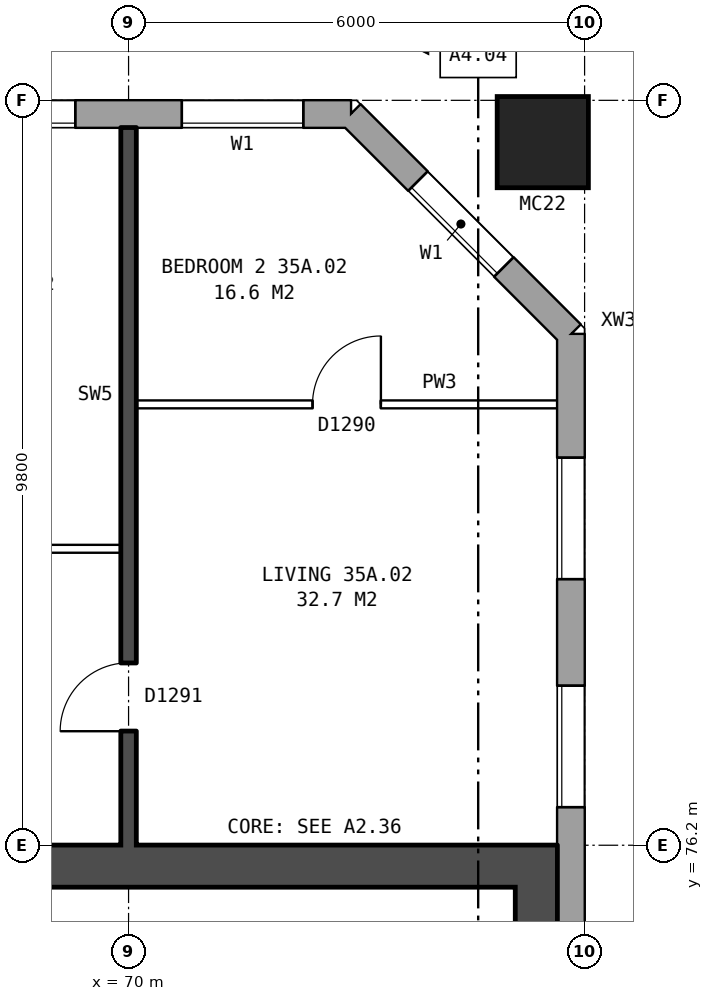
"""IFC4 building model, lengths in metres.
Left out: names, types, materials, properties, quantities, classifications, styles, units other than length and angle.
Written with IfcOpenShell. Run it as: python <this file> out.ifc"""

import sys

from ifc_helpers import new_model, si_unit, direction, frame, frame_2d, origin, origin_2d, place, context, subcontext, project, spatial, rectangle, hollow_rectangle, extrude, element, fill, save


model = new_model("IFC4")
c1 = context("Model", 3, precision=1e-05, world=origin(), true_north=direction((0.0, 1.0)))
c2 = subcontext(c1, "Body", "Model", "MODEL_VIEW")
j1 = project(units=[si_unit("LENGTHUNIT", "METRE"), si_unit("PLANEANGLEUNIT", "RADIAN")], contexts=[c1])
p1 = place(None, origin())
s1 = spatial("IfcSite", under=j1, at=p1, CompositionType="ELEMENT")
p2 = place(p1, origin())
s2 = spatial("IfcBuilding", under=s1, at=p2, CompositionType="ELEMENT")
p3 = place(p2, frame((0.0, 0.0, 126.8)))
s3 = spatial("IfcBuildingStorey", under=s2, at=p3, CompositionType="ELEMENT", Elevation=126.8)
p4 = place(p3, frame((75.45, 85.45, 0.0), z_axis=(0.0, 0.0, 1.0), x_axis=(1.0, 0.0, 0.0)))
e1 = element("IfcColumn", 1, at=p4, inside=s3, PredefinedType="COLUMN", context=c2, shape_type="SweptSolid", body=[
    extrude(hollow_rectangle(XDim=1.2, YDim=1.2, WallThickness=0.065, at=origin_2d()), origin(), (0.0, 0.0, 1.0), 3.1),
])
p5 = place(p3, frame((75.82, 57.075, 0.0), z_axis=(0.0, 0.0, 1.0), x_axis=(0.0, 1.0, 0.0)))
e2 = element("IfcWall", 2, at=p5, inside=s3, PredefinedType="STANDARD", context=c2, shape_type="SweptSolid", body=[
    extrude(rectangle(XDim=25.851, YDim=0.36, at=frame_2d((12.925, 0.0))), origin(), (0.0, 0.0, 1.0), 2.85),
])
p6 = place(p5, frame((1.625, 0.0, 0.8)))
e3 = element("IfcOpeningElement", 3, at=p6, cuts=e2, PredefinedType="OPENING", context=c2, shape_type="SweptSolid", body=[
    extrude(rectangle(XDim=1.6, YDim=1.8, at=frame_2d((0.8, 0.9))), frame((0.0, 0.19, 0.0), z_axis=(0.0, -1.0, 0.0), x_axis=(1.0, 0.0, 0.0)), (0.0, 0.0, 1.0), 0.38),
])
p7 = place(p5, frame((4.625, 0.0, 0.8)))
e4 = element("IfcOpeningElement", 4, at=p7, cuts=e2, PredefinedType="OPENING", context=c2, shape_type="SweptSolid", body=[
    extrude(rectangle(XDim=1.6, YDim=1.8, at=frame_2d((0.8, 0.9))), frame((0.0, 0.19, 0.0), z_axis=(0.0, -1.0, 0.0), x_axis=(1.0, 0.0, 0.0)), (0.0, 0.0, 1.0), 0.38),
])
p8 = place(p5, frame((19.625, 0.0, 0.8)))
e5 = element("IfcOpeningElement", 5, at=p8, cuts=e2, PredefinedType="OPENING", context=c2, shape_type="SweptSolid", body=[
    extrude(rectangle(XDim=1.6, YDim=1.8, at=frame_2d((0.8, 0.9))), frame((0.0, 0.19, 0.0), z_axis=(0.0, -1.0, 0.0), x_axis=(1.0, 0.0, 0.0)), (0.0, 0.0, 1.0), 0.38),
])
p9 = place(p5, frame((22.625, 0.0, 0.8)))
e6 = element("IfcOpeningElement", 6, at=p9, cuts=e2, PredefinedType="OPENING", context=c2, shape_type="SweptSolid", body=[
    extrude(rectangle(XDim=1.6, YDim=1.8, at=frame_2d((0.8, 0.9))), frame((0.0, 0.19, 0.0), z_axis=(0.0, -1.0, 0.0), x_axis=(1.0, 0.0, 0.0)), (0.0, 0.0, 1.0), 0.38),
])
p10 = place(p3, frame((75.82, 82.925, 0.0), z_axis=(0.0, 0.0, 1.0), x_axis=(-0.707106781187, 0.707106781187, 0.0)))
e7 = element("IfcWall", 7, at=p10, inside=s3, PredefinedType="STANDARD", context=c2, shape_type="SweptSolid", body=[
    extrude(rectangle(XDim=4.094, YDim=0.36, at=frame_2d((2.047, 0.0))), origin(), (0.0, 0.0, 1.0), 2.85),
])
p11 = place(p10, frame((1.247, 0.0, 0.8)))
e8 = element("IfcOpeningElement", 8, at=p11, cuts=e7, PredefinedType="OPENING", context=c2, shape_type="SweptSolid", body=[
    extrude(rectangle(XDim=1.6, YDim=1.8, at=frame_2d((0.8, 0.9))), frame((0.0, 0.19, 0.0), z_axis=(0.0, -1.0, 0.0), x_axis=(1.0, 0.0, 0.0)), (0.0, 0.0, 1.0), 0.38),
])
p12 = place(p3, frame((72.925, 85.82, 0.0), z_axis=(0.0, 0.0, 1.0), x_axis=(-1.0, 0.0, 0.0)))
e9 = element("IfcWall", 9, at=p12, inside=s3, PredefinedType="STANDARD", context=c2, shape_type="SweptSolid", body=[
    extrude(rectangle(XDim=43.101, YDim=0.36, at=frame_2d((21.55, 0.0))), origin(), (0.0, 0.0, 1.0), 2.85),
])
p13 = place(p12, frame((0.625, 0.0, 0.8)))
e10 = element("IfcOpeningElement", 10, at=p13, cuts=e9, PredefinedType="OPENING", context=c2, shape_type="SweptSolid", body=[
    extrude(rectangle(XDim=1.6, YDim=1.8, at=frame_2d((0.8, 0.9))), frame((0.0, 0.19, 0.0), z_axis=(0.0, -1.0, 0.0), x_axis=(1.0, 0.0, 0.0)), (0.0, 0.0, 1.0), 0.38),
])
p14 = place(p12, frame((3.625, 0.0, 0.8)))
e11 = element("IfcOpeningElement", 11, at=p14, cuts=e9, PredefinedType="OPENING", context=c2, shape_type="SweptSolid", body=[
    extrude(rectangle(XDim=1.6, YDim=1.8, at=frame_2d((0.8, 0.9))), frame((0.0, 0.19, 0.0), z_axis=(0.0, -1.0, 0.0), x_axis=(1.0, 0.0, 0.0)), (0.0, 0.0, 1.0), 0.38),
])
p15 = place(p12, frame((5.525, 0.0, 1.7)))
e12 = element("IfcOpeningElement", 12, at=p15, cuts=e9, PredefinedType="OPENING", context=c2, shape_type="SweptSolid", body=[
    extrude(rectangle(XDim=0.8, YDim=0.9, at=frame_2d((0.4, 0.45))), frame((0.0, 0.19, 0.0), z_axis=(0.0, -1.0, 0.0), x_axis=(1.0, 0.0, 0.0)), (0.0, 0.0, 1.0), 0.38),
])
p16 = place(p12, frame((9.625, 0.0, 0.8)))
e13 = element("IfcOpeningElement", 13, at=p16, cuts=e9, PredefinedType="OPENING", context=c2, shape_type="SweptSolid", body=[
    extrude(rectangle(XDim=1.6, YDim=1.8, at=frame_2d((0.8, 0.9))), frame((0.0, 0.19, 0.0), z_axis=(0.0, -1.0, 0.0), x_axis=(1.0, 0.0, 0.0)), (0.0, 0.0, 1.0), 0.38),
])
p17 = place(p12, frame((12.625, 0.0, 0.8)))
e14 = element("IfcOpeningElement", 14, at=p17, cuts=e9, PredefinedType="OPENING", context=c2, shape_type="SweptSolid", body=[
    extrude(rectangle(XDim=1.6, YDim=1.8, at=frame_2d((0.8, 0.9))), frame((0.0, 0.19, 0.0), z_axis=(0.0, -1.0, 0.0), x_axis=(1.0, 0.0, 0.0)), (0.0, 0.0, 1.0), 0.38),
])
p18 = place(p12, frame((15.625, 0.0, 0.8)))
e15 = element("IfcOpeningElement", 15, at=p18, cuts=e9, PredefinedType="OPENING", context=c2, shape_type="SweptSolid", body=[
    extrude(rectangle(XDim=1.6, YDim=1.8, at=frame_2d((0.8, 0.9))), frame((0.0, 0.19, 0.0), z_axis=(0.0, -1.0, 0.0), x_axis=(1.0, 0.0, 0.0)), (0.0, 0.0, 1.0), 0.38),
])
p19 = place(p12, frame((18.625, 0.0, 0.8)))
e16 = element("IfcOpeningElement", 16, at=p19, cuts=e9, PredefinedType="OPENING", context=c2, shape_type="SweptSolid", body=[
    extrude(rectangle(XDim=1.6, YDim=1.8, at=frame_2d((0.8, 0.9))), frame((0.0, 0.19, 0.0), z_axis=(0.0, -1.0, 0.0), x_axis=(1.0, 0.0, 0.0)), (0.0, 0.0, 1.0), 0.38),
])
p20 = place(p12, frame((21.625, 0.0, 0.8)))
e17 = element("IfcOpeningElement", 17, at=p20, cuts=e9, PredefinedType="OPENING", context=c2, shape_type="SweptSolid", body=[
    extrude(rectangle(XDim=1.6, YDim=1.8, at=frame_2d((0.8, 0.9))), frame((0.0, 0.19, 0.0), z_axis=(0.0, -1.0, 0.0), x_axis=(1.0, 0.0, 0.0)), (0.0, 0.0, 1.0), 0.38),
])
p21 = place(p12, frame((24.625, 0.0, 0.8)))
e18 = element("IfcOpeningElement", 18, at=p21, cuts=e9, PredefinedType="OPENING", context=c2, shape_type="SweptSolid", body=[
    extrude(rectangle(XDim=1.6, YDim=1.8, at=frame_2d((0.8, 0.9))), frame((0.0, 0.19, 0.0), z_axis=(0.0, -1.0, 0.0), x_axis=(1.0, 0.0, 0.0)), (0.0, 0.0, 1.0), 0.38),
])
p22 = place(p12, frame((27.625, 0.0, 0.8)))
e19 = element("IfcOpeningElement", 19, at=p22, cuts=e9, PredefinedType="OPENING", context=c2, shape_type="SweptSolid", body=[
    extrude(rectangle(XDim=1.6, YDim=1.8, at=frame_2d((0.8, 0.9))), frame((0.0, 0.19, 0.0), z_axis=(0.0, -1.0, 0.0), x_axis=(1.0, 0.0, 0.0)), (0.0, 0.0, 1.0), 0.38),
])
p23 = place(p12, frame((30.625, 0.0, 0.8)))
e20 = element("IfcOpeningElement", 20, at=p23, cuts=e9, PredefinedType="OPENING", context=c2, shape_type="SweptSolid", body=[
    extrude(rectangle(XDim=1.6, YDim=1.8, at=frame_2d((0.8, 0.9))), frame((0.0, 0.19, 0.0), z_axis=(0.0, -1.0, 0.0), x_axis=(1.0, 0.0, 0.0)), (0.0, 0.0, 1.0), 0.38),
])
p24 = place(p12, frame((33.125, 0.0, 0.8)))
e21 = element("IfcOpeningElement", 21, at=p24, cuts=e9, PredefinedType="OPENING", context=c2, shape_type="SweptSolid", body=[
    extrude(rectangle(XDim=1.4, YDim=1.8, at=frame_2d((0.7, 0.9))), frame((0.0, 0.19, 0.0), z_axis=(0.0, -1.0, 0.0), x_axis=(1.0, 0.0, 0.0)), (0.0, 0.0, 1.0), 0.38),
])
p25 = place(p12, frame((34.825, 0.0, 0.8)))
e22 = element("IfcOpeningElement", 22, at=p25, cuts=e9, PredefinedType="OPENING", context=c2, shape_type="SweptSolid", body=[
    extrude(rectangle(XDim=0.6, YDim=0.9, at=frame_2d((0.3, 0.45))), frame((0.0, 0.19, 0.0), z_axis=(0.0, -1.0, 0.0), x_axis=(1.0, 0.0, 0.0)), (0.0, 0.0, 1.0), 0.38),
])
p26 = place(p12, frame((39.625, 0.0, 0.8)))
e23 = element("IfcOpeningElement", 23, at=p26, cuts=e9, PredefinedType="OPENING", context=c2, shape_type="SweptSolid", body=[
    extrude(rectangle(XDim=1.6, YDim=1.8, at=frame_2d((0.8, 0.9))), frame((0.0, 0.19, 0.0), z_axis=(0.0, -1.0, 0.0), x_axis=(1.0, 0.0, 0.0)), (0.0, 0.0, 1.0), 0.38),
])
p27 = place(p12, frame((7.525, 0.0, 0.8)))
e24 = element("IfcOpeningElement", 24, at=p27, cuts=e9, PredefinedType="OPENING", context=c2, shape_type="SweptSolid", body=[
    extrude(rectangle(XDim=1.2, YDim=0.9, at=frame_2d((0.6, 0.45))), frame((0.0, 0.19, 0.0), z_axis=(0.0, -1.0, 0.0), x_axis=(1.0, 0.0, 0.0)), (0.0, 0.0, 1.0), 0.38),
])
p28 = place(p12, frame((36.725, 0.0, 1.7)))
e25 = element("IfcOpeningElement", 25, at=p28, cuts=e9, PredefinedType="OPENING", context=c2, shape_type="SweptSolid", body=[
    extrude(rectangle(XDim=0.6, YDim=0.9, at=frame_2d((0.3, 0.45))), frame((0.0, 0.19, 0.0), z_axis=(0.0, -1.0, 0.0), x_axis=(1.0, 0.0, 0.0)), (0.0, 0.0, 1.0), 0.38),
])
p29 = place(p12, frame((37.725, 0.0, 0.8)))
e26 = element("IfcOpeningElement", 26, at=p29, cuts=e9, PredefinedType="OPENING", context=c2, shape_type="SweptSolid", body=[
    extrude(rectangle(XDim=1.0, YDim=1.8, at=frame_2d((0.5, 0.9))), frame((0.0, 0.19, 0.0), z_axis=(0.0, -1.0, 0.0), x_axis=(1.0, 0.0, 0.0)), (0.0, 0.0, 1.0), 0.38),
])
p30 = place(p3, frame((75.365, 63.8, 0.0), z_axis=(0.0, 0.0, 1.0), x_axis=(0.0, 1.0, 0.0)))
e27 = element("IfcWall", 27, at=p30, inside=s3, PredefinedType="SHEAR", context=c2, shape_type="SweptSolid", body=[
    extrude(rectangle(XDim=12.4, YDim=0.55, at=frame_2d((6.2, 0.0))), origin(), (0.0, 0.0, 1.0), 2.85),
])
p31 = place(p3, frame((67.19, 75.925, 0.0), z_axis=(0.0, 0.0, 1.0), x_axis=(1.0, 0.0, 0.0)))
e28 = element("IfcWall", 28, at=p31, inside=s3, PredefinedType="SHEAR", context=c2, shape_type="SweptSolid", body=[
    extrude(rectangle(XDim=7.9, YDim=0.55, at=frame_2d((3.95, 0.0))), origin(), (0.0, 0.0, 1.0), 2.85),
])
p32 = place(p3, frame((64.1, 80.1, 0.0), z_axis=(0.0, 0.0, 1.0), x_axis=(1.0, 0.0, 0.0)))
e29 = element("IfcWall", 29, at=p32, inside=s3, PredefinedType="PARTITIONING", context=c2, shape_type="SweptSolid", body=[
    extrude(rectangle(XDim=5.8, YDim=0.1, at=frame_2d((2.9, 0.0))), origin(), (0.0, 0.0, 1.0), 2.85),
])
p33 = place(p32, frame((3.6, 0.0, 0.0)))
e30 = element("IfcOpeningElement", 30, at=p33, cuts=e29, PredefinedType="OPENING", context=c2, shape_type="SweptSolid", body=[
    extrude(rectangle(XDim=0.9, YDim=2.1, at=frame_2d((0.45, 1.05))), frame((0.0, 0.06, 0.0), z_axis=(0.0, -1.0, 0.0), x_axis=(1.0, 0.0, 0.0)), (0.0, 0.0, 1.0), 0.12),
])
p34 = place(p32, frame((0.7, 0.0, 0.0)))
e31 = element("IfcOpeningElement", 31, at=p34, cuts=e29, PredefinedType="OPENING", context=c2, shape_type="SweptSolid", body=[
    extrude(rectangle(XDim=0.9, YDim=2.1, at=frame_2d((0.45, 1.05))), frame((0.0, 0.06, 0.0), z_axis=(0.0, -1.0, 0.0), x_axis=(1.0, 0.0, 0.0)), (0.0, 0.0, 1.0), 0.12),
])
p35 = place(p3, frame((70.1, 82.0, 0.0), z_axis=(0.0, 0.0, 1.0), x_axis=(1.0, 0.0, 0.0)))
e32 = element("IfcWall", 32, at=p35, inside=s3, PredefinedType="PARTITIONING", context=c2, shape_type="SweptSolid", body=[
    extrude(rectangle(XDim=5.54, YDim=0.1, at=frame_2d((2.77, 0.0))), origin(), (0.0, 0.0, 1.0), 2.85),
])
p36 = place(p35, frame((2.32, 0.0, 0.0)))
e33 = element("IfcOpeningElement", 33, at=p36, cuts=e32, PredefinedType="OPENING", context=c2, shape_type="SweptSolid", body=[
    extrude(rectangle(XDim=0.9, YDim=2.1, at=frame_2d((0.45, 1.05))), frame((0.0, 0.06, 0.0), z_axis=(0.0, -1.0, 0.0), x_axis=(1.0, 0.0, 0.0)), (0.0, 0.0, 1.0), 0.12),
])
p37 = place(p3, frame((70.0, 76.2, 0.0), z_axis=(0.0, 0.0, 1.0), x_axis=(0.0, 1.0, 0.0)))
e34 = element("IfcWall", 34, at=p37, inside=s3, PredefinedType="SOLIDWALL", context=c2, shape_type="SweptSolid", body=[
    extrude(rectangle(XDim=9.44, YDim=0.2, at=frame_2d((4.72, 0.0))), origin(), (0.0, 0.0, 1.0), 2.85),
])
p38 = place(p37, frame((1.5, 0.0, 0.0)))
e35 = element("IfcOpeningElement", 35, at=p38, cuts=e34, PredefinedType="OPENING", context=c2, shape_type="SweptSolid", body=[
    extrude(rectangle(XDim=0.9, YDim=2.1, at=frame_2d((0.45, 1.05))), frame((0.0, 0.11, 0.0), z_axis=(0.0, -1.0, 0.0), x_axis=(1.0, 0.0, 0.0)), (0.0, 0.0, 1.0), 0.22),
])
p39 = place(p8, origin())
e36 = element("IfcWindow", 36, at=p39, inside=s3, PartitioningType="SINGLE_PANEL", PredefinedType="WINDOW", context=c2, shape_type="SweptSolid", body=[
    extrude(rectangle(XDim=1.6, YDim=1.8, at=frame_2d((0.8, 0.9))), frame((0.0, 0.15, 0.0), z_axis=(0.0, -1.0, 0.0), x_axis=(1.0, 0.0, 0.0)), (0.0, 0.0, 1.0), 0.06),
])
fill(e5, e36)
p40 = place(p9, origin())
e37 = element("IfcWindow", 37, at=p40, inside=s3, PartitioningType="SINGLE_PANEL", PredefinedType="WINDOW", context=c2, shape_type="SweptSolid", body=[
    extrude(rectangle(XDim=1.6, YDim=1.8, at=frame_2d((0.8, 0.9))), frame((0.0, 0.15, 0.0), z_axis=(0.0, -1.0, 0.0), x_axis=(1.0, 0.0, 0.0)), (0.0, 0.0, 1.0), 0.06),
])
fill(e6, e37)
p41 = place(p11, origin())
e38 = element("IfcWindow", 38, at=p41, inside=s3, PartitioningType="SINGLE_PANEL", PredefinedType="WINDOW", context=c2, shape_type="SweptSolid", body=[
    extrude(rectangle(XDim=1.6, YDim=1.8, at=frame_2d((0.8, 0.9))), frame((0.0, 0.15, 0.0), z_axis=(0.0, -1.0, 0.0), x_axis=(1.0, 0.0, 0.0)), (0.0, 0.0, 1.0), 0.06),
])
fill(e8, e38)
p42 = place(p13, origin())
e39 = element("IfcWindow", 39, at=p42, inside=s3, PartitioningType="SINGLE_PANEL", PredefinedType="WINDOW", context=c2, shape_type="SweptSolid", body=[
    extrude(rectangle(XDim=1.6, YDim=1.8, at=frame_2d((0.8, 0.9))), frame((0.0, 0.15, 0.0), z_axis=(0.0, -1.0, 0.0), x_axis=(1.0, 0.0, 0.0)), (0.0, 0.0, 1.0), 0.06),
])
fill(e10, e39)
p43 = place(p14, origin())
e40 = element("IfcWindow", 40, at=p43, inside=s3, PartitioningType="SINGLE_PANEL", PredefinedType="WINDOW", context=c2, shape_type="SweptSolid", body=[
    extrude(rectangle(XDim=1.6, YDim=1.8, at=frame_2d((0.8, 0.9))), frame((0.0, 0.15, 0.0), z_axis=(0.0, -1.0, 0.0), x_axis=(1.0, 0.0, 0.0)), (0.0, 0.0, 1.0), 0.06),
])
fill(e11, e40)
p44 = place(p36, origin())
e41 = element("IfcDoor", 41, at=p44, inside=s3, OperationType="SINGLE_SWING_RIGHT", PredefinedType="DOOR", context=c2, shape_type="SweptSolid", body=[
    extrude(rectangle(XDim=0.9, YDim=2.1, at=frame_2d((0.45, 1.05))), frame((0.0, 0.025, 0.0), z_axis=(0.0, -1.0, 0.0), x_axis=(1.0, 0.0, 0.0)), (0.0, 0.0, 1.0), 0.05),
])
fill(e33, e41)
p45 = place(p38, origin())
e42 = element("IfcDoor", 42, at=p45, inside=s3, OperationType="SINGLE_SWING_LEFT", PredefinedType="DOOR", context=c2, shape_type="SweptSolid", body=[
    extrude(rectangle(XDim=0.9, YDim=2.1, at=frame_2d((0.45, 1.05))), frame((0.0, 0.025, 0.0), z_axis=(0.0, -1.0, 0.0), x_axis=(1.0, 0.0, 0.0)), (0.0, 0.0, 1.0), 0.05),
])
fill(e35, e42)
save(model, sys.argv[1])
